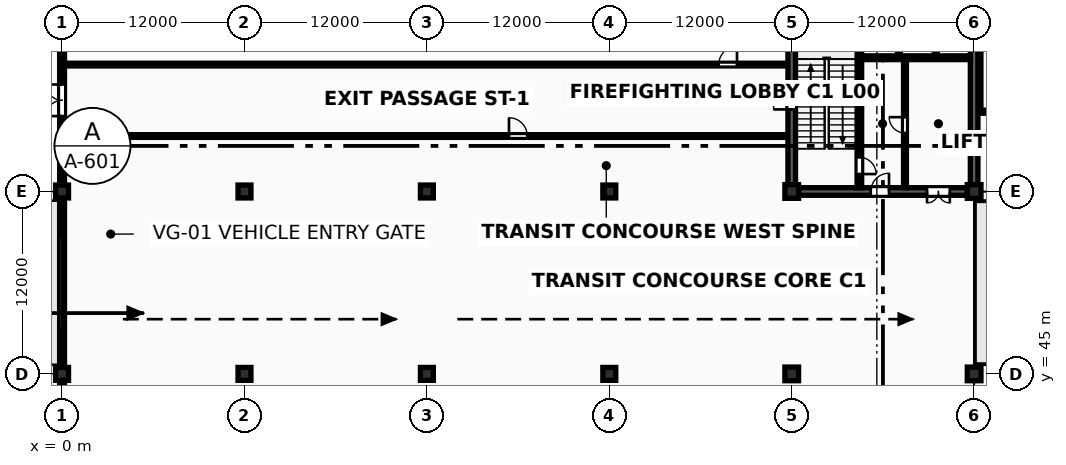
"""IFC4 building model, lengths in metres.
Left out: names, types, materials, properties, quantities, classifications, styles, units other than length and angle.
Written with IfcOpenShell. Run it as: python <this file> out.ifc"""

import sys

from ifc_helpers import new_model, si_unit, direction, frame, frame_2d, origin, origin_2d, place, context, subcontext, project, spatial, rectangle, extrude, element, fill, save


model = new_model("IFC4")
c1 = context("Model", 3, precision=1e-05, world=origin(), true_north=direction((0.0, 1.0)))
c2 = subcontext(c1, "Body", "Model", "MODEL_VIEW")
j1 = project(units=[si_unit("LENGTHUNIT", "METRE"), si_unit("PLANEANGLEUNIT", "RADIAN")], contexts=[c1])
p1 = place(None, origin())
s1 = spatial("IfcSite", under=j1, at=p1, CompositionType="ELEMENT")
p2 = place(p1, origin())
s2 = spatial("IfcBuilding", under=s1, at=p2, CompositionType="ELEMENT")
p3 = place(p2, origin())
s3 = spatial("IfcBuildingStorey", under=s2, at=p3, CompositionType="ELEMENT", Elevation=0.0)
for number, where, z_axis, x_axis in (
    (1, (0.0, 45.0, 0.0), (0.0, 0.0, 1.0), (1.0, 0.0, 0.0)),
    (2, (0.0, 57.0, 0.0), (0.0, 0.0, 1.0), (1.0, 0.0, 0.0)),
    (3, (12.0, 45.0, 0.0), (0.0, 0.0, 1.0), (1.0, 0.0, 0.0)),
    (4, (12.0, 57.0, 0.0), (0.0, 0.0, 1.0), (1.0, 0.0, 0.0)),
    (5, (24.0, 45.0, 0.0), (0.0, 0.0, 1.0), (1.0, 0.0, 0.0)),
    (6, (24.0, 57.0, 0.0), (0.0, 0.0, 1.0), (1.0, 0.0, 0.0)),
    (7, (36.0, 45.0, 0.0), (0.0, 0.0, 1.0), (1.0, 0.0, 0.0)),
    (8, (36.0, 57.0, 0.0), (0.0, 0.0, 1.0), (1.0, 0.0, 0.0)),
):
    element("IfcColumn", number, at=place(p3, frame(where, z_axis=z_axis, x_axis=x_axis)), inside=s3, PredefinedType="COLUMN", context=c2, shape_type="SweptSolid", body=[
        extrude(rectangle(XDim=0.85, YDim=0.85, at=origin_2d()), origin(), (0.0, 0.0, 1.0), 5.4),
    ])
for number, where, z_axis, x_axis in (
    (9, (48.0, 45.0, 0.0), (0.0, 0.0, 1.0), (1.0, 0.0, 0.0)),
    (10, (48.0, 57.0, 0.0), (0.0, 0.0, 1.0), (1.0, 0.0, 0.0)),
    (11, (60.0, 45.0, 0.0), (0.0, 0.0, 1.0), (1.0, 0.0, 0.0)),
    (12, (60.0, 57.0, 0.0), (0.0, 0.0, 1.0), (1.0, 0.0, 0.0)),
):
    element("IfcColumn", number, at=place(p3, frame(where, z_axis=z_axis, x_axis=x_axis)), inside=s3, PredefinedType="COLUMN", context=c2, shape_type="SweptSolid", body=[
        extrude(rectangle(XDim=0.9, YDim=0.9, at=origin_2d()), origin(), (0.0, 0.0, 1.0), 5.4),
    ])
p4 = place(p3, frame((60.347, 62.25, 0.0), z_axis=(0.0, 0.0, 1.0), x_axis=(1.0, 0.0, 0.0)))
e13 = element("IfcWall", 13, at=p4, inside=s3, PredefinedType="SOLIDWALL", context=c2, shape_type="SweptSolid", body=[
    extrude(rectangle(XDim=1.233, YDim=0.2, at=frame_2d((0.617, 0.0))), origin(), (0.0, 0.0, 1.0), 5.203),
])
p5 = place(p3, frame((60.347, 62.33, 0.0), z_axis=(0.0, 0.0, 1.0), x_axis=(0.0, 1.0, 0.0)))
e14 = element("IfcWall", 14, at=p5, inside=s3, PredefinedType="SOLIDWALL", context=c2, shape_type="SweptSolid", body=[
    extrude(rectangle(XDim=4.14, YDim=0.2, at=frame_2d((2.07, 0.0))), origin(), (0.0, 0.0, 1.0), 5.203),
])
p6 = place(p3, frame((48.447, 57.0, 0.0), z_axis=(0.0, 0.0, 1.0), x_axis=(1.0, 0.0, 0.0)))
e15 = element("IfcWall", 15, at=p6, inside=s3, PredefinedType="SHEAR", context=c2, shape_type="SweptSolid", body=[
    extrude(rectangle(XDim=11.106, YDim=0.5, at=frame_2d((5.553, 0.0))), origin(), (0.0, 0.0, 1.0), 5.203),
])
p7 = place(p6, frame((4.753, 0.0, 0.0)))
e16 = element("IfcOpeningElement", 16, at=p7, cuts=e15, PredefinedType="OPENING", context=c2, shape_type="SweptSolid", body=[
    extrude(rectangle(XDim=1.2, YDim=2.2, at=frame_2d((0.6, 1.1))), frame((0.0, 0.265, 0.0), z_axis=(0.0, -1.0, 0.0), x_axis=(1.0, 0.0, 0.0)), (0.0, 0.0, 1.0), 0.53),
])
p8 = place(p6, frame((8.453, 0.0, 0.0)))
e17 = element("IfcOpeningElement", 17, at=p8, cuts=e15, PredefinedType="OPENING", context=c2, shape_type="SweptSolid", body=[
    extrude(rectangle(XDim=1.5, YDim=2.25, at=frame_2d((0.75, 1.125))), frame((0.0, 0.265, 0.0), z_axis=(0.0, -1.0, 0.0), x_axis=(1.0, 0.0, 0.0)), (0.0, 0.0, 1.0), 0.53),
])
p9 = place(p3, frame((48.0, 57.447, 0.0), z_axis=(0.0, 0.0, 1.0), x_axis=(0.0, 1.0, 0.0)))
e18 = element("IfcWall", 18, at=p9, inside=s3, PredefinedType="SHEAR", context=c2, shape_type="SweptSolid", body=[
    extrude(rectangle(XDim=11.106, YDim=0.5, at=frame_2d((5.553, 0.0))), origin(), (0.0, 0.0, 1.0), 5.203),
])
p10 = place(p9, frame((4.953, 0.0, 0.0)))
e19 = element("IfcOpeningElement", 19, at=p10, cuts=e18, PredefinedType="OPENING", context=c2, shape_type="SweptSolid", body=[
    extrude(rectangle(XDim=1.2, YDim=2.2, at=frame_2d((0.6, 1.1))), frame((0.0, 0.265, 0.0), z_axis=(0.0, -1.0, 0.0), x_axis=(1.0, 0.0, 0.0)), (0.0, 0.0, 1.0), 0.53),
])
p11 = place(p3, frame((60.0, 57.447, 0.0), z_axis=(0.0, 0.0, 1.0), x_axis=(0.0, 1.0, 0.0)))
e20 = element("IfcWall", 20, at=p11, inside=s3, PredefinedType="SHEAR", context=c2, shape_type="SweptSolid", body=[
    extrude(rectangle(XDim=11.106, YDim=0.5, at=frame_2d((5.553, 0.0))), origin(), (0.0, 0.0, 1.0), 5.203),
])
p12 = place(p3, frame((52.45, 57.247, 0.0), z_axis=(0.0, 0.0, 1.0), x_axis=(0.0, 1.0, 0.0)))
e21 = element("IfcWall", 21, at=p12, inside=s3, PredefinedType="SHEAR", context=c2, shape_type="SweptSolid", body=[
    extrude(rectangle(XDim=11.506, YDim=0.3, at=frame_2d((5.753, 0.0))), origin(), (0.0, 0.0, 1.0), 5.203),
])
p13 = place(p12, frame((0.9, 0.0, 0.0)))
e22 = element("IfcOpeningElement", 22, at=p13, cuts=e21, PredefinedType="OPENING", context=c2, shape_type="SweptSolid", body=[
    extrude(rectangle(XDim=1.1, YDim=2.2, at=frame_2d((0.55, 1.1))), frame((0.0, 0.165, 0.0), z_axis=(0.0, -1.0, 0.0), x_axis=(1.0, 0.0, 0.0)), (0.0, 0.0, 1.0), 0.33),
])
p14 = place(p3, frame((52.597, 65.8, 0.0), z_axis=(0.0, 0.0, 1.0), x_axis=(1.0, 0.0, 0.0)))
e23 = element("IfcWall", 23, at=p14, inside=s3, PredefinedType="SOLIDWALL", context=c2, shape_type="SweptSolid", body=[
    extrude(rectangle(XDim=7.156, YDim=0.25, at=frame_2d((3.578, 0.0))), origin(), (0.0, 0.0, 1.0), 5.203),
])
p15 = place(p14, frame((0.653, 0.0, 0.0)))
e24 = element("IfcOpeningElement", 24, at=p15, cuts=e23, PredefinedType="OPENING", context=c2, shape_type="SweptSolid", body=[
    extrude(rectangle(XDim=1.1, YDim=2.24, at=frame_2d((0.55, 1.12))), frame((0.0, 0.14, 0.0), z_axis=(0.0, -1.0, 0.0), x_axis=(1.0, 0.0, 0.0)), (0.0, 0.0, 1.0), 0.28),
])
p16 = place(p14, frame((3.153, 0.0, 0.0)))
e25 = element("IfcOpeningElement", 25, at=p16, cuts=e23, PredefinedType="OPENING", context=c2, shape_type="SweptSolid", body=[
    extrude(rectangle(XDim=1.05, YDim=2.2, at=frame_2d((0.525, 1.1))), frame((0.0, 0.14, 0.0), z_axis=(0.0, -1.0, 0.0), x_axis=(1.0, 0.0, 0.0)), (0.0, 0.0, 1.0), 0.28),
])
p17 = place(p14, frame((5.528, 0.0, 0.0)))
e26 = element("IfcOpeningElement", 26, at=p17, cuts=e23, PredefinedType="OPENING", context=c2, shape_type="SweptSolid", body=[
    extrude(rectangle(XDim=1.05, YDim=2.2, at=frame_2d((0.525, 1.1))), frame((0.0, 0.14, 0.0), z_axis=(0.0, -1.0, 0.0), x_axis=(1.0, 0.0, 0.0)), (0.0, 0.0, 1.0), 0.28),
])
for number, where, z_axis, x_axis in (
    (27, (55.05, 65.92, 0.0), (0.0, 0.0, 1.0), (0.0, 1.0, 0.0)),
    (28, (57.48, 65.92, 0.0), (0.0, 0.0, 1.0), (0.0, 1.0, 0.0)),
):
    element("IfcWall", number, at=place(p3, frame(where, z_axis=z_axis, x_axis=x_axis)), inside=s3, PredefinedType="SOLIDWALL", context=c2, shape_type="SweptSolid", body=[
        extrude(rectangle(XDim=2.83, YDim=0.2, at=frame_2d((1.415, 0.0))), origin(), (0.0, 0.0, 1.0), 5.193),
    ])
p18 = place(p3, frame((55.45, 57.25, 0.0), z_axis=(0.0, 0.0, 1.0), x_axis=(0.0, 1.0, 0.0)))
e29 = element("IfcWall", 29, at=p18, inside=s3, PredefinedType="SOLIDWALL", context=c2, shape_type="SweptSolid", body=[
    extrude(rectangle(XDim=8.43, YDim=0.19, at=frame_2d((4.215, 0.0))), origin(), (0.0, 0.0, 1.0), 5.193),
])
p19 = place(p18, frame((3.6, 0.0, 0.0)))
e30 = element("IfcOpeningElement", 30, at=p19, cuts=e29, PredefinedType="OPENING", context=c2, shape_type="SweptSolid", body=[
    extrude(rectangle(XDim=1.04, YDim=2.18, at=frame_2d((0.52, 1.09))), frame((0.0, 0.11, 0.0), z_axis=(0.0, -1.0, 0.0), x_axis=(1.0, 0.0, 0.0)), (0.0, 0.0, 1.0), 0.22),
])
p20 = place(p3, frame((0.0, 36.473, 0.0), z_axis=(0.0, 0.0, 1.0), x_axis=(0.0, 1.0, 0.0)))
e31 = element("IfcWall", 31, at=p20, inside=s3, PredefinedType="SOLIDWALL", context=c2, shape_type="SweptSolid", body=[
    extrude(rectangle(XDim=8.104, YDim=0.32, at=frame_2d((4.052, 0.0))), origin(), (0.0, 0.0, 1.0), 3.85),
])
p21 = place(p20, frame((3.027, 0.0, 0.55)))
e32 = element("IfcOpeningElement", 32, at=p21, cuts=e31, PredefinedType="OPENING", context=c2, shape_type="SweptSolid", body=[
    extrude(rectangle(XDim=2.05, YDim=1.25, at=frame_2d((1.025, 0.625))), frame((0.0, 0.175, 0.0), z_axis=(0.0, -1.0, 0.0), x_axis=(1.0, 0.0, 0.0)), (0.0, 0.0, 1.0), 0.35),
])
p22 = place(p3, frame((0.0, 45.423, 0.0), z_axis=(0.0, 0.0, 1.0), x_axis=(0.0, 1.0, 0.0)))
e33 = element("IfcWall", 33, at=p22, inside=s3, PredefinedType="SOLIDWALL", context=c2, shape_type="SweptSolid", body=[
    extrude(rectangle(XDim=11.154, YDim=0.32, at=frame_2d((5.577, 0.0))), origin(), (0.0, 0.0, 1.0), 3.85),
])
p23 = place(p22, frame((2.577, 0.0, 0.0)))
e34 = element("IfcOpeningElement", 34, at=p23, cuts=e33, PredefinedType="OPENING", context=c2, shape_type="SweptSolid", body=[
    extrude(rectangle(XDim=6.0, YDim=3.2, at=frame_2d((3.0, 1.6))), frame((0.0, 0.175, 0.0), z_axis=(0.0, -1.0, 0.0), x_axis=(1.0, 0.0, 0.0)), (0.0, 0.0, 1.0), 0.35),
])
p24 = place(p3, frame((0.0, 57.423, 0.0), z_axis=(0.0, 0.0, 1.0), x_axis=(0.0, 1.0, 0.0)))
e35 = element("IfcWall", 35, at=p24, inside=s3, PredefinedType="SOLIDWALL", context=c2, shape_type="SweptSolid", body=[
    extrude(rectangle(XDim=11.154, YDim=0.32, at=frame_2d((5.577, 0.0))), origin(), (0.0, 0.0, 1.0), 3.85),
])
p25 = place(p24, frame((4.537, 0.0, 0.0)))
e36 = element("IfcOpeningElement", 36, at=p25, cuts=e35, PredefinedType="OPENING", context=c2, shape_type="SweptSolid", body=[
    extrude(rectangle(XDim=2.08, YDim=2.44, at=frame_2d((1.04, 1.22))), frame((0.0, 0.175, 0.0), z_axis=(0.0, -1.0, 0.0), x_axis=(1.0, 0.0, 0.0)), (0.0, 0.0, 1.0), 0.35),
])
p26 = place(p3, frame((0.4, 60.65, 0.0), z_axis=(0.0, 0.0, 1.0), x_axis=(1.0, 0.0, 0.0)))
e37 = element("IfcWall", 37, at=p26, inside=s3, PredefinedType="SOLIDWALL", context=c2, shape_type="SweptSolid", body=[
    extrude(rectangle(XDim=47.3, YDim=0.18, at=frame_2d((23.65, 0.0))), origin(), (0.0, 0.0, 1.0), 2.6),
])
p27 = place(p26, frame((29.0, 0.0, 0.0)))
e38 = element("IfcOpeningElement", 38, at=p27, cuts=e37, PredefinedType="OPENING", context=c2, shape_type="SweptSolid", body=[
    extrude(rectangle(XDim=1.2, YDim=2.2, at=frame_2d((0.6, 1.1))), frame((0.0, 0.105, 0.0), z_axis=(0.0, -1.0, 0.0), x_axis=(1.0, 0.0, 0.0)), (0.0, 0.0, 1.0), 0.21),
])
p28 = place(p3, frame((0.4, 65.35, 0.0), z_axis=(0.0, 0.0, 1.0), x_axis=(1.0, 0.0, 0.0)))
e39 = element("IfcWall", 39, at=p28, inside=s3, PredefinedType="SOLIDWALL", context=c2, shape_type="SweptSolid", body=[
    extrude(rectangle(XDim=47.3, YDim=0.18, at=frame_2d((23.65, 0.0))), origin(), (0.0, 0.0, 1.0), 2.6),
])
p29 = place(p28, frame((42.8, 0.0, 0.0)))
e40 = element("IfcOpeningElement", 40, at=p29, cuts=e39, PredefinedType="OPENING", context=c2, shape_type="SweptSolid", body=[
    extrude(rectangle(XDim=1.2, YDim=2.2, at=frame_2d((0.6, 1.1))), frame((0.0, 0.105, 0.0), z_axis=(0.0, -1.0, 0.0), x_axis=(1.0, 0.0, 0.0)), (0.0, 0.0, 1.0), 0.21),
])
p30 = place(p23, origin())
e41 = element("IfcDoor", 41, at=p30, inside=s3, OperationType="DOUBLE_DOOR_SLIDING", PredefinedType="GATE", context=c2, shape_type="SweptSolid", body=[
    extrude(rectangle(XDim=6.0, YDim=3.2, at=frame_2d((3.0, 1.6))), frame((0.0, 0.025, 0.0), z_axis=(0.0, -1.0, 0.0), x_axis=(1.0, 0.0, 0.0)), (0.0, 0.0, 1.0), 0.05),
])
fill(e34, e41)
p31 = place(p25, origin())
e42 = element("IfcDoor", 42, at=p31, inside=s3, OperationType="DOUBLE_DOOR_SINGLE_SWING", PredefinedType="DOOR", context=c2, shape_type="SweptSolid", body=[
    extrude(rectangle(XDim=2.08, YDim=2.44, at=frame_2d((1.04, 1.22))), frame((0.0, 0.025, 0.0), z_axis=(0.0, -1.0, 0.0), x_axis=(1.0, 0.0, 0.0)), (0.0, 0.0, 1.0), 0.05),
])
fill(e36, e42)
p32 = place(p13, origin())
e43 = element("IfcDoor", 43, at=p32, inside=s3, OperationType="SINGLE_SWING_LEFT", PredefinedType="DOOR", context=c2, shape_type="SweptSolid", body=[
    extrude(rectangle(XDim=1.1, YDim=2.2, at=frame_2d((0.55, 1.1))), frame((0.0, 0.025, 0.0), z_axis=(0.0, -1.0, 0.0), x_axis=(1.0, 0.0, 0.0)), (0.0, 0.0, 1.0), 0.05),
])
fill(e22, e43)
p33 = place(p19, origin())
e44 = element("IfcDoor", 44, at=p33, inside=s3, OperationType="SINGLE_SWING_RIGHT", PredefinedType="DOOR", context=c2, shape_type="SweptSolid", body=[
    extrude(rectangle(XDim=1.04, YDim=2.18, at=frame_2d((0.52, 1.09))), frame((0.0, 0.025, 0.0), z_axis=(0.0, -1.0, 0.0), x_axis=(1.0, 0.0, 0.0)), (0.0, 0.0, 1.0), 0.05),
])
fill(e30, e44)
p34 = place(p7, frame((1.2, 0.0, 0.0), z_axis=(0.0, 0.0, 1.0), x_axis=(-1.0, 0.0, 0.0)))
e45 = element("IfcDoor", 45, at=p34, inside=s3, OperationType="SINGLE_SWING_RIGHT", PredefinedType="DOOR", context=c2, shape_type="SweptSolid", body=[
    extrude(rectangle(XDim=1.2, YDim=2.2, at=frame_2d((0.6, 1.1))), frame((0.0, 0.025, 0.0), z_axis=(0.0, -1.0, 0.0), x_axis=(1.0, 0.0, 0.0)), (0.0, 0.0, 1.0), 0.05),
])
fill(e16, e45)
p35 = place(p8, origin())
e46 = element("IfcDoor", 46, at=p35, inside=s3, OperationType="DOUBLE_DOOR_SINGLE_SWING", PredefinedType="DOOR", context=c2, shape_type="SweptSolid", body=[
    extrude(rectangle(XDim=1.5, YDim=2.25, at=frame_2d((0.75, 1.125))), frame((0.0, 0.025, 0.0), z_axis=(0.0, -1.0, 0.0), x_axis=(1.0, 0.0, 0.0)), (0.0, 0.0, 1.0), 0.05),
])
fill(e17, e46)
p36 = place(p10, origin())
e47 = element("IfcDoor", 47, at=p36, inside=s3, OperationType="SINGLE_SWING_LEFT", PredefinedType="DOOR", context=c2, shape_type="SweptSolid", body=[
    extrude(rectangle(XDim=1.2, YDim=2.2, at=frame_2d((0.6, 1.1))), frame((0.0, 0.025, 0.0), z_axis=(0.0, -1.0, 0.0), x_axis=(1.0, 0.0, 0.0)), (0.0, 0.0, 1.0), 0.05),
])
fill(e19, e47)
p37 = place(p15, origin())
e48 = element("IfcDoor", 48, at=p37, inside=s3, OperationType="SLIDING_TO_LEFT", PredefinedType="USERDEFINED", context=c2, shape_type="SweptSolid", body=[
    extrude(rectangle(XDim=1.1, YDim=2.24, at=frame_2d((0.55, 1.12))), frame((0.0, 0.025, 0.0), z_axis=(0.0, -1.0, 0.0), x_axis=(1.0, 0.0, 0.0)), (0.0, 0.0, 1.0), 0.05),
])
fill(e24, e48)
p38 = place(p16, origin())
e49 = element("IfcDoor", 49, at=p38, inside=s3, OperationType="SLIDING_TO_LEFT", PredefinedType="USERDEFINED", context=c2, shape_type="SweptSolid", body=[
    extrude(rectangle(XDim=1.05, YDim=2.2, at=frame_2d((0.525, 1.1))), frame((0.0, 0.025, 0.0), z_axis=(0.0, -1.0, 0.0), x_axis=(1.0, 0.0, 0.0)), (0.0, 0.0, 1.0), 0.05),
])
fill(e25, e49)
p39 = place(p17, origin())
e50 = element("IfcDoor", 50, at=p39, inside=s3, OperationType="SLIDING_TO_LEFT", PredefinedType="USERDEFINED", context=c2, shape_type="SweptSolid", body=[
    extrude(rectangle(XDim=1.05, YDim=2.2, at=frame_2d((0.525, 1.1))), frame((0.0, 0.025, 0.0), z_axis=(0.0, -1.0, 0.0), x_axis=(1.0, 0.0, 0.0)), (0.0, 0.0, 1.0), 0.05),
])
fill(e26, e50)
p40 = place(p27, origin())
e51 = element("IfcDoor", 51, at=p40, inside=s3, OperationType="SINGLE_SWING_LEFT", PredefinedType="DOOR", context=c2, shape_type="SweptSolid", body=[
    extrude(rectangle(XDim=1.2, YDim=2.2, at=frame_2d((0.6, 1.1))), frame((0.0, 0.025, 0.0), z_axis=(0.0, -1.0, 0.0), x_axis=(1.0, 0.0, 0.0)), (0.0, 0.0, 1.0), 0.05),
])
fill(e38, e51)
p41 = place(p29, frame((1.2, 0.0, 0.0), z_axis=(0.0, 0.0, 1.0), x_axis=(-1.0, 0.0, 0.0)))
e52 = element("IfcDoor", 52, at=p41, inside=s3, OperationType="SINGLE_SWING_RIGHT", PredefinedType="DOOR", context=c2, shape_type="SweptSolid", body=[
    extrude(rectangle(XDim=1.2, YDim=2.2, at=frame_2d((0.6, 1.1))), frame((0.0, 0.025, 0.0), z_axis=(0.0, -1.0, 0.0), x_axis=(1.0, 0.0, 0.0)), (0.0, 0.0, 1.0), 0.05),
])
fill(e40, e52)
save(model, sys.argv[1])
